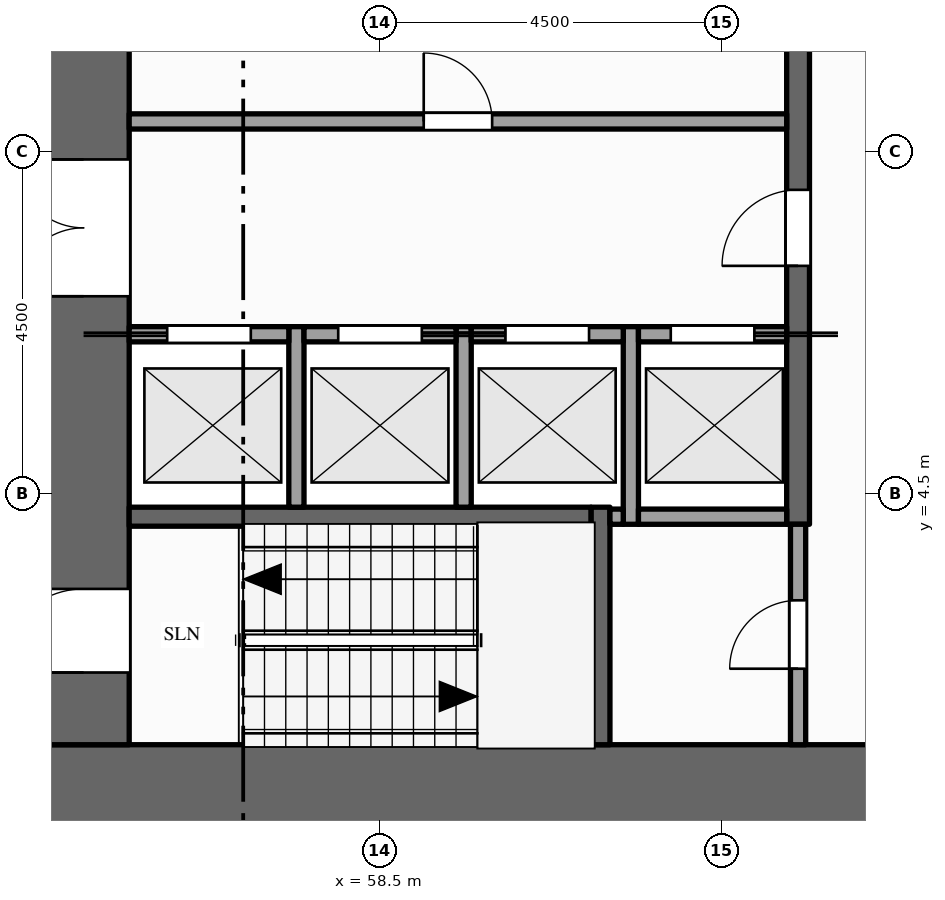
"""IFC4 building model, lengths in metres.
Left out: names, types, materials, properties, quantities, classifications, styles, units other than length and angle.
Written with IfcOpenShell. Run it as: python <this file> out.ifc"""

import sys

from ifc_helpers import new_model, si_unit, direction, frame, frame_2d, origin, place, context, subcontext, project, spatial, rectangle, extrude, element, fill, save


model = new_model("IFC4")
c1 = context("Model", 3, precision=1e-05, world=origin(), true_north=direction((0.0, 1.0)))
c2 = subcontext(c1, "Body", "Model", "MODEL_VIEW")
j1 = project(units=[si_unit("LENGTHUNIT", "METRE"), si_unit("PLANEANGLEUNIT", "RADIAN")], contexts=[c1])
p1 = place(None, origin())
s1 = spatial("IfcSite", under=j1, at=p1, CompositionType="ELEMENT")
p2 = place(p1, origin())
s2 = spatial("IfcBuilding", under=s1, at=p2, CompositionType="ELEMENT")
p3 = place(p2, frame((0.0, 0.0, 61.0)))
s3 = spatial("IfcBuildingStorey", under=s2, at=p3, CompositionType="ELEMENT", Elevation=61.0)
p4 = place(p3, frame((67.5, 0.6, -0.15), z_axis=(0.0, 0.0, 1.0), x_axis=(-1.0, 0.0, 0.0)))
e1 = element("IfcWall", 1, at=p4, inside=s3, PredefinedType="SHEAR", context=c2, shape_type="SweptSolid", body=[
    extrude(rectangle(XDim=13.5, YDim=1.2, at=frame_2d((6.75, 0.0))), origin(), (0.0, 0.0, 1.0), 4.0),
])
p5 = place(p3, frame((54.6, 1.2, -0.15), z_axis=(0.0, 0.0, 1.0), x_axis=(0.0, 1.0, 0.0)))
e2 = element("IfcWall", 2, at=p5, inside=s3, PredefinedType="SHEAR", context=c2, shape_type="SweptSolid", body=[
    extrude(rectangle(XDim=20.1, YDim=1.2, at=frame_2d((10.05, 0.0))), origin(), (0.0, 0.0, 1.0), 4.0),
])
p6 = place(p5, frame((5.9, 0.0, 0.15)))
e3 = element("IfcOpeningElement", 3, at=p6, cuts=e2, PredefinedType="OPENING", context=c2, shape_type="SweptSolid", body=[
    extrude(rectangle(XDim=1.8, YDim=2.1, at=frame_2d((0.9, 1.05))), frame((0.0, 0.61, 0.0), z_axis=(0.0, -1.0, 0.0), x_axis=(1.0, 0.0, 0.0)), (0.0, 0.0, 1.0), 1.22),
])
p7 = place(p5, frame((11.95, 0.0, 0.15)))
e4 = element("IfcOpeningElement", 4, at=p7, cuts=e2, PredefinedType="OPENING", context=c2, shape_type="SweptSolid", body=[
    extrude(rectangle(XDim=1.1, YDim=2.1, at=frame_2d((0.55, 1.05))), frame((0.0, 0.61, 0.0), z_axis=(0.0, -1.0, 0.0), x_axis=(1.0, 0.0, 0.0)), (0.0, 0.0, 1.0), 1.22),
])
p8 = place(p5, frame((0.95, 0.0, 0.15)))
e5 = element("IfcOpeningElement", 5, at=p8, cuts=e2, PredefinedType="OPENING", context=c2, shape_type="SweptSolid", body=[
    extrude(rectangle(XDim=1.1, YDim=2.1, at=frame_2d((0.55, 1.05))), frame((0.0, 0.61, 0.0), z_axis=(0.0, -1.0, 0.0), x_axis=(1.0, 0.0, 0.0)), (0.0, 0.0, 1.0), 1.22),
])
p9 = place(p5, frame((18.15, 0.0, 0.15)))
e6 = element("IfcOpeningElement", 6, at=p9, cuts=e2, PredefinedType="OPENING", context=c2, shape_type="SweptSolid", body=[
    extrude(rectangle(XDim=1.1, YDim=2.1, at=frame_2d((0.55, 1.05))), frame((0.0, 0.61, 0.0), z_axis=(0.0, -1.0, 0.0), x_axis=(1.0, 0.0, 0.0)), (0.0, 0.0, 1.0), 1.22),
])
for number, where, z_axis, x_axis in (
    (7, (57.4, 4.325, 0.0), (0.0, 0.0, 1.0), (0.0, 1.0, 0.0)),
    (8, (59.6, 4.325, 0.0), (0.0, 0.0, 1.0), (0.0, 1.0, 0.0)),
):
    element("IfcWall", number, at=place(p3, frame(where, z_axis=z_axis, x_axis=x_axis)), inside=s3, PredefinedType="SOLIDWALL", context=c2, shape_type="SweptSolid", body=[
        extrude(rectangle(XDim=2.375, YDim=0.2, at=frame_2d((1.188, 0.0))), origin(), (0.0, 0.0, 1.0), 3.85),
    ])
p10 = place(p3, frame((61.4, 1.2, 0.0), z_axis=(0.0, 0.0, 1.0), x_axis=(0.0, 1.0, 0.0)))
e9 = element("IfcWall", 9, at=p10, inside=s3, PredefinedType="SHEAR", context=c2, shape_type="SweptSolid", body=[
    extrude(rectangle(XDim=3.125, YDim=0.25, at=frame_2d((1.562, 0.0))), origin(), (0.0, 0.0, 1.0), 3.85),
])
p11 = place(p3, frame((61.8, 4.1, 0.0), z_axis=(0.0, 0.0, 1.0), x_axis=(0.0, 1.0, 0.0)))
e10 = element("IfcWall", 10, at=p11, inside=s3, PredefinedType="SOLIDWALL", context=c2, shape_type="SweptSolid", body=[
    extrude(rectangle(XDim=2.6, YDim=0.2, at=frame_2d((1.3, 0.0))), origin(), (0.0, 0.0, 1.0), 3.85),
])
p12 = place(p3, frame((64.0, 1.2, 0.0), z_axis=(0.0, 0.0, 1.0), x_axis=(0.0, 1.0, 0.0)))
e11 = element("IfcWall", 11, at=p12, inside=s3, PredefinedType="PARTITIONING", context=c2, shape_type="SweptSolid", body=[
    extrude(rectangle(XDim=2.9, YDim=0.2, at=frame_2d((1.45, 0.0))), origin(), (0.0, 0.0, 1.0), 3.85),
])
p13 = place(p12, frame((1.0, 0.0, 0.0)))
e12 = element("IfcOpeningElement", 12, at=p13, cuts=e11, PredefinedType="OPENING", context=c2, shape_type="SweptSolid", body=[
    extrude(rectangle(XDim=0.9, YDim=2.1, at=frame_2d((0.45, 1.05))), frame((0.0, 0.11, 0.0), z_axis=(0.0, -1.0, 0.0), x_axis=(1.0, 0.0, 0.0)), (0.0, 0.0, 1.0), 0.22),
])
p14 = place(p3, frame((64.0, 4.1, 0.0), z_axis=(0.0, 0.0, 1.0), x_axis=(0.0, 1.0, 0.0)))
e13 = element("IfcWall", 13, at=p14, inside=s3, PredefinedType="SHEAR", context=c2, shape_type="SweptSolid", body=[
    extrude(rectangle(XDim=14.5, YDim=0.3, at=frame_2d((7.25, 0.0))), origin(), (0.0, 0.0, 1.0), 3.85),
])
p15 = place(p14, frame((3.4, 0.0, 0.0)))
e14 = element("IfcOpeningElement", 14, at=p15, cuts=e13, PredefinedType="OPENING", context=c2, shape_type="SweptSolid", body=[
    extrude(rectangle(XDim=1.0, YDim=2.1, at=frame_2d((0.5, 1.05))), frame((0.0, 0.16, 0.0), z_axis=(0.0, -1.0, 0.0), x_axis=(1.0, 0.0, 0.0)), (0.0, 0.0, 1.0), 0.32),
])
p16 = place(p14, frame((9.1, 0.0, 0.0)))
e15 = element("IfcOpeningElement", 15, at=p16, cuts=e13, PredefinedType="OPENING", context=c2, shape_type="SweptSolid", body=[
    extrude(rectangle(XDim=1.0, YDim=2.1, at=frame_2d((0.5, 1.05))), frame((0.0, 0.16, 0.0), z_axis=(0.0, -1.0, 0.0), x_axis=(1.0, 0.0, 0.0)), (0.0, 0.0, 1.0), 0.32),
])
p17 = place(p3, frame((55.2, 4.2, 0.0), z_axis=(0.0, 0.0, 1.0), x_axis=(1.0, 0.0, 0.0)))
e16 = element("IfcWall", 16, at=p17, inside=s3, PredefinedType="SHEAR", context=c2, shape_type="SweptSolid", body=[
    extrude(rectangle(XDim=6.075, YDim=0.25, at=frame_2d((3.038, 0.0))), origin(), (0.0, 0.0, 1.0), 3.85),
])
p18 = place(p3, frame((61.525, 4.2, 0.0), z_axis=(0.0, 0.0, 1.0), x_axis=(1.0, 0.0, 0.0)))
e17 = element("IfcWall", 17, at=p18, inside=s3, PredefinedType="SOLIDWALL", context=c2, shape_type="SweptSolid", body=[
    extrude(rectangle(XDim=0.175, YDim=0.2, at=frame_2d((0.087, 0.0))), origin(), (0.0, 0.0, 1.0), 3.85),
])
p19 = place(p3, frame((61.9, 4.2, 0.0), z_axis=(0.0, 0.0, 1.0), x_axis=(1.0, 0.0, 0.0)))
e18 = element("IfcWall", 18, at=p19, inside=s3, PredefinedType="SOLIDWALL", context=c2, shape_type="SweptSolid", body=[
    extrude(rectangle(XDim=1.95, YDim=0.2, at=frame_2d((0.975, 0.0))), origin(), (0.0, 0.0, 1.0), 3.85),
])
p20 = place(p3, frame((55.2, 6.6, 0.0), z_axis=(0.0, 0.0, 1.0), x_axis=(1.0, 0.0, 0.0)))
e19 = element("IfcWall", 19, at=p20, inside=s3, PredefinedType="SOLIDWALL", context=c2, shape_type="SweptSolid", body=[
    extrude(rectangle(XDim=2.1, YDim=0.2, at=frame_2d((1.05, 0.0))), origin(), (0.0, 0.0, 1.0), 3.85),
])
p21 = place(p20, frame((0.5, 0.0, 0.012)))
e20 = element("IfcOpeningElement", 20, at=p21, cuts=e19, PredefinedType="OPENING", context=c2, shape_type="SweptSolid", body=[
    extrude(rectangle(XDim=1.1, YDim=2.1, at=frame_2d((0.55, 1.05))), frame((0.0, 0.11, 0.0), z_axis=(0.0, -1.0, 0.0), x_axis=(1.0, 0.0, 0.0)), (0.0, 0.0, 1.0), 0.22),
])
p22 = place(p3, frame((57.5, 6.6, 0.0), z_axis=(0.0, 0.0, 1.0), x_axis=(1.0, 0.0, 0.0)))
e21 = element("IfcWall", 21, at=p22, inside=s3, PredefinedType="SOLIDWALL", context=c2, shape_type="SweptSolid", body=[
    extrude(rectangle(XDim=2.0, YDim=0.2, at=frame_2d((1.0, 0.0))), origin(), (0.0, 0.0, 1.0), 3.85),
])
p23 = place(p22, frame((0.45, 0.0, 0.012)))
e22 = element("IfcOpeningElement", 22, at=p23, cuts=e21, PredefinedType="OPENING", context=c2, shape_type="SweptSolid", body=[
    extrude(rectangle(XDim=1.1, YDim=2.1, at=frame_2d((0.55, 1.05))), frame((0.0, 0.11, 0.0), z_axis=(0.0, -1.0, 0.0), x_axis=(1.0, 0.0, 0.0)), (0.0, 0.0, 1.0), 0.22),
])
p24 = place(p3, frame((59.7, 6.6, 0.0), z_axis=(0.0, 0.0, 1.0), x_axis=(1.0, 0.0, 0.0)))
e23 = element("IfcWall", 23, at=p24, inside=s3, PredefinedType="SOLIDWALL", context=c2, shape_type="SweptSolid", body=[
    extrude(rectangle(XDim=2.0, YDim=0.2, at=frame_2d((1.0, 0.0))), origin(), (0.0, 0.0, 1.0), 3.85),
])
p25 = place(p24, frame((0.45, 0.0, 0.012)))
e24 = element("IfcOpeningElement", 24, at=p25, cuts=e23, PredefinedType="OPENING", context=c2, shape_type="SweptSolid", body=[
    extrude(rectangle(XDim=1.1, YDim=2.1, at=frame_2d((0.55, 1.05))), frame((0.0, 0.11, 0.0), z_axis=(0.0, -1.0, 0.0), x_axis=(1.0, 0.0, 0.0)), (0.0, 0.0, 1.0), 0.22),
])
p26 = place(p3, frame((61.9, 6.6, 0.0), z_axis=(0.0, 0.0, 1.0), x_axis=(1.0, 0.0, 0.0)))
e25 = element("IfcWall", 25, at=p26, inside=s3, PredefinedType="SOLIDWALL", context=c2, shape_type="SweptSolid", body=[
    extrude(rectangle(XDim=1.95, YDim=0.2, at=frame_2d((0.975, 0.0))), origin(), (0.0, 0.0, 1.0), 3.85),
])
p27 = place(p26, frame((0.425, 0.0, 0.012)))
e26 = element("IfcOpeningElement", 26, at=p27, cuts=e25, PredefinedType="OPENING", context=c2, shape_type="SweptSolid", body=[
    extrude(rectangle(XDim=1.1, YDim=2.1, at=frame_2d((0.55, 1.05))), frame((0.0, 0.11, 0.0), z_axis=(0.0, -1.0, 0.0), x_axis=(1.0, 0.0, 0.0)), (0.0, 0.0, 1.0), 0.22),
])
p28 = place(p3, frame((55.2, 9.4, 0.0), z_axis=(0.0, 0.0, 1.0), x_axis=(1.0, 0.0, 0.0)))
e27 = element("IfcWall", 27, at=p28, inside=s3, PredefinedType="PARTITIONING", context=c2, shape_type="SweptSolid", body=[
    extrude(rectangle(XDim=8.65, YDim=0.2, at=frame_2d((4.325, 0.0))), origin(), (0.0, 0.0, 1.0), 3.85),
])
p29 = place(p28, frame((3.875, 0.0, 0.0)))
e28 = element("IfcOpeningElement", 28, at=p29, cuts=e27, PredefinedType="OPENING", context=c2, shape_type="SweptSolid", body=[
    extrude(rectangle(XDim=0.9, YDim=2.1, at=frame_2d((0.45, 1.05))), frame((0.0, 0.11, 0.0), z_axis=(0.0, -1.0, 0.0), x_axis=(1.0, 0.0, 0.0)), (0.0, 0.0, 1.0), 0.22),
])
p30 = place(p21, origin())
e29 = element("IfcDoor", 29, at=p30, inside=s3, OperationType="SLIDING_TO_LEFT", PredefinedType="DOOR", context=c2, shape_type="SweptSolid", body=[
    extrude(rectangle(XDim=1.1, YDim=2.1, at=frame_2d((0.55, 1.05))), frame((0.0, 0.025, 0.0), z_axis=(0.0, -1.0, 0.0), x_axis=(1.0, 0.0, 0.0)), (0.0, 0.0, 1.0), 0.05),
])
fill(e20, e29)
p31 = place(p23, origin())
e30 = element("IfcDoor", 30, at=p31, inside=s3, OperationType="SLIDING_TO_RIGHT", PredefinedType="DOOR", context=c2, shape_type="SweptSolid", body=[
    extrude(rectangle(XDim=1.1, YDim=2.1, at=frame_2d((0.55, 1.05))), frame((0.0, 0.025, 0.0), z_axis=(0.0, -1.0, 0.0), x_axis=(1.0, 0.0, 0.0)), (0.0, 0.0, 1.0), 0.05),
])
fill(e22, e30)
p32 = place(p25, origin())
e31 = element("IfcDoor", 31, at=p32, inside=s3, OperationType="SLIDING_TO_LEFT", PredefinedType="DOOR", context=c2, shape_type="SweptSolid", body=[
    extrude(rectangle(XDim=1.1, YDim=2.1, at=frame_2d((0.55, 1.05))), frame((0.0, 0.025, 0.0), z_axis=(0.0, -1.0, 0.0), x_axis=(1.0, 0.0, 0.0)), (0.0, 0.0, 1.0), 0.05),
])
fill(e24, e31)
p33 = place(p27, origin())
e32 = element("IfcDoor", 32, at=p33, inside=s3, OperationType="SLIDING_TO_RIGHT", PredefinedType="DOOR", context=c2, shape_type="SweptSolid", body=[
    extrude(rectangle(XDim=1.1, YDim=2.1, at=frame_2d((0.55, 1.05))), frame((0.0, 0.025, 0.0), z_axis=(0.0, -1.0, 0.0), x_axis=(1.0, 0.0, 0.0)), (0.0, 0.0, 1.0), 0.05),
])
fill(e26, e32)
p34 = place(p6, origin())
e33 = element("IfcDoor", 33, at=p34, inside=s3, OperationType="DOUBLE_DOOR_SINGLE_SWING", PredefinedType="DOOR", context=c2, shape_type="SweptSolid", body=[
    extrude(rectangle(XDim=1.8, YDim=2.1, at=frame_2d((0.9, 1.05))), frame((0.0, 0.025, 0.0), z_axis=(0.0, -1.0, 0.0), x_axis=(1.0, 0.0, 0.0)), (0.0, 0.0, 1.0), 0.05),
])
fill(e3, e33)
p35 = place(p15, origin())
e34 = element("IfcDoor", 34, at=p35, inside=s3, OperationType="SINGLE_SWING_LEFT", PredefinedType="DOOR", context=c2, shape_type="SweptSolid", body=[
    extrude(rectangle(XDim=1.0, YDim=2.1, at=frame_2d((0.5, 1.05))), frame((0.0, 0.025, 0.0), z_axis=(0.0, -1.0, 0.0), x_axis=(1.0, 0.0, 0.0)), (0.0, 0.0, 1.0), 0.05),
])
fill(e14, e34)
p36 = place(p8, origin())
e35 = element("IfcDoor", 35, at=p36, inside=s3, OperationType="SINGLE_SWING_LEFT", PredefinedType="DOOR", context=c2, shape_type="SweptSolid", body=[
    extrude(rectangle(XDim=1.1, YDim=2.1, at=frame_2d((0.55, 1.05))), frame((0.0, 0.025, 0.0), z_axis=(0.0, -1.0, 0.0), x_axis=(1.0, 0.0, 0.0)), (0.0, 0.0, 1.0), 0.05),
])
fill(e5, e35)
p37 = place(p13, origin())
e36 = element("IfcDoor", 36, at=p37, inside=s3, OperationType="SINGLE_SWING_LEFT", PredefinedType="DOOR", context=c2, shape_type="SweptSolid", body=[
    extrude(rectangle(XDim=0.9, YDim=2.1, at=frame_2d((0.45, 1.05))), frame((0.0, 0.025, 0.0), z_axis=(0.0, -1.0, 0.0), x_axis=(1.0, 0.0, 0.0)), (0.0, 0.0, 1.0), 0.05),
])
fill(e12, e36)
p38 = place(p29, origin())
e37 = element("IfcDoor", 37, at=p38, inside=s3, OperationType="SINGLE_SWING_LEFT", PredefinedType="DOOR", context=c2, shape_type="SweptSolid", body=[
    extrude(rectangle(XDim=0.9, YDim=2.1, at=frame_2d((0.45, 1.05))), frame((0.0, 0.025, 0.0), z_axis=(0.0, -1.0, 0.0), x_axis=(1.0, 0.0, 0.0)), (0.0, 0.0, 1.0), 0.05),
])
fill(e28, e37)
save(model, sys.argv[1])
